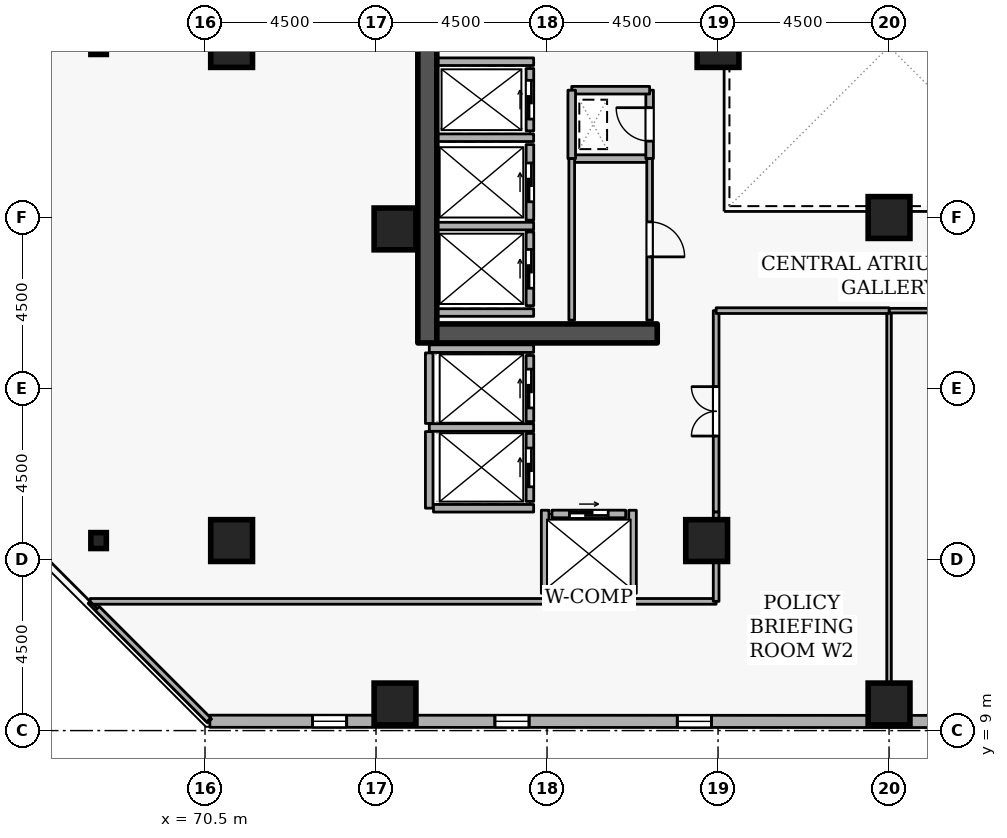
"""IFC4 building model, lengths in metres.
Left out: names, types, materials, properties, quantities, classifications, styles, units other than length and angle.
Written with IfcOpenShell. Run it as: python <this file> out.ifc"""

import sys

from ifc_helpers import new_model, si_unit, direction, frame, frame_2d, origin, origin_2d, place, context, subcontext, project, spatial, rectangle, i_section, extrude, element, fill, save


model = new_model("IFC4")
c1 = context("Model", 3, precision=1e-05, world=origin(), true_north=direction((0.0, 1.0)))
c2 = subcontext(c1, "Body", "Model", "MODEL_VIEW")
j1 = project(units=[si_unit("LENGTHUNIT", "METRE"), si_unit("PLANEANGLEUNIT", "RADIAN")], contexts=[c1])
p1 = place(None, origin())
s1 = spatial("IfcSite", under=j1, at=p1, CompositionType="ELEMENT")
p2 = place(p1, origin())
s2 = spatial("IfcBuilding", under=s1, at=p2, CompositionType="ELEMENT")
p3 = place(p2, frame((0.0, 0.0, 178.5)))
s3 = spatial("IfcBuildingStorey", under=s2, at=p3, CompositionType="ELEMENT", Elevation=178.5)
p4 = place(p3, frame((76.35, 19.2, 0.0), z_axis=(0.0, 0.0, 1.0), x_axis=(0.0, 1.0, 0.0)))
e1 = element("IfcWall", 1, at=p4, inside=s3, PredefinedType="SHEAR", context=c2, shape_type="SweptSolid", body=[
    extrude(rectangle(XDim=15.6, YDim=0.5, at=frame_2d((7.8, 0.0))), origin(), (0.0, 0.0, 1.0), 3.6),
])
p5 = place(p3, frame((76.6, 19.45, 0.0), z_axis=(0.0, 0.0, 1.0), x_axis=(1.0, 0.0, 0.0)))
e2 = element("IfcWall", 2, at=p5, inside=s3, PredefinedType="SHEAR", context=c2, shape_type="SweptSolid", body=[
    extrude(rectangle(XDim=5.8, YDim=0.5, at=frame_2d((2.9, 0.0))), origin(), (0.0, 0.0, 1.0), 3.6),
])
for number, where, z_axis, x_axis in (
    (3, (71.2, 14.0, 0.0), (0.0, 0.0, 1.0), (1.0, 0.0, 0.0)),
    (4, (71.2, 27.0, 0.0), (0.0, 0.0, 1.0), (1.0, 0.0, 0.0)),
    (5, (88.5, 9.7, 0.0), (0.0, 0.0, 1.0), (1.0, 0.0, 0.0)),
    (6, (75.5, 9.7, 0.0), (0.0, 0.0, 1.0), (1.0, 0.0, 0.0)),
    (7, (83.7, 14.0, 0.0), (0.0, 0.0, 1.0), (1.0, 0.0, 0.0)),
    (8, (75.5, 22.2, 0.0), (0.0, 0.0, 1.0), (1.0, 0.0, 0.0)),
    (9, (84.0, 27.0, 0.0), (0.0, 0.0, 1.0), (1.0, 0.0, 0.0)),
    (10, (88.5, 22.5, 0.0), (0.0, 0.0, 1.0), (1.0, 0.0, 0.0)),
):
    element("IfcColumn", number, at=place(p3, frame(where, z_axis=z_axis, x_axis=x_axis)), inside=s3, PredefinedType="COLUMN", context=c2, shape_type="SweptSolid", body=[
        extrude(rectangle(XDim=1.1, YDim=1.1, at=origin_2d()), origin(), (0.0, 0.0, 1.0), 3.6),
    ])
for number, where, z_axis, x_axis in (
    (11, (67.7, 14.0, 0.0), (0.0, 0.0, 1.0), (1.0, 0.0, 0.0)),
    (12, (67.7, 27.0, 0.0), (0.0, 0.0, 1.0), (1.0, 0.0, 0.0)),
):
    element("IfcColumn", number, at=place(p3, frame(where, z_axis=z_axis, x_axis=x_axis)), inside=s3, PredefinedType="COLUMN", context=c2, shape_type="SweptSolid", body=[
        extrude(i_section(OverallWidth=0.407, OverallDepth=0.419, WebThickness=0.031, FlangeThickness=0.049, FilletRadius=0.015, at=origin_2d()), origin(), (0.0, 0.0, 1.0), 3.6),
    ])
p6 = place(p3, frame((70.628, 9.246, 0.0), z_axis=(0.0, 0.0, 1.0), x_axis=(0.999999944762, -0.000332378036, 0.0)))
e13 = element("IfcWall", 13, at=p6, inside=s3, PredefinedType="STANDARD", context=c2, shape_type="SweptSolid", body=[
    extrude(rectangle(XDim=33.054, YDim=0.32, at=frame_2d((16.527, 0.0))), origin(), (0.0, 0.0, 1.0), 2.7),
])
p7 = place(p6, frame((2.7, 0.0, 0.72)))
e14 = element("IfcOpeningElement", 14, at=p7, cuts=e13, PredefinedType="OPENING", context=c2, shape_type="SweptSolid", body=[
    extrude(rectangle(XDim=0.9, YDim=1.75, at=frame_2d((0.45, 0.875))), frame((0.0, 0.17, 0.0), z_axis=(0.0, -1.0, 0.0), x_axis=(1.0, 0.0, 0.0)), (0.0, 0.0, 1.0), 0.34),
])
p8 = place(p6, frame((7.5, 0.0, 0.72)))
e15 = element("IfcOpeningElement", 15, at=p8, cuts=e13, PredefinedType="OPENING", context=c2, shape_type="SweptSolid", body=[
    extrude(rectangle(XDim=0.9, YDim=1.75, at=frame_2d((0.45, 0.875))), frame((0.0, 0.17, 0.0), z_axis=(0.0, -1.0, 0.0), x_axis=(1.0, 0.0, 0.0)), (0.0, 0.0, 1.0), 0.34),
])
p9 = place(p6, frame((12.3, 0.0, 0.72)))
e16 = element("IfcOpeningElement", 16, at=p9, cuts=e13, PredefinedType="OPENING", context=c2, shape_type="SweptSolid", body=[
    extrude(rectangle(XDim=0.9, YDim=1.75, at=frame_2d((0.45, 0.875))), frame((0.0, 0.17, 0.0), z_axis=(0.0, -1.0, 0.0), x_axis=(1.0, 0.0, 0.0)), (0.0, 0.0, 1.0), 0.34),
])
p10 = place(p6, frame((21.9, 0.0, 0.72)))
e17 = element("IfcOpeningElement", 17, at=p10, cuts=e13, PredefinedType="OPENING", context=c2, shape_type="SweptSolid", body=[
    extrude(rectangle(XDim=0.9, YDim=1.75, at=frame_2d((0.45, 0.875))), frame((0.0, 0.17, 0.0), z_axis=(0.0, -1.0, 0.0), x_axis=(1.0, 0.0, 0.0)), (0.0, 0.0, 1.0), 0.34),
])
p11 = place(p6, frame((26.7, 0.0, 0.72)))
e18 = element("IfcOpeningElement", 18, at=p11, cuts=e13, PredefinedType="OPENING", context=c2, shape_type="SweptSolid", body=[
    extrude(rectangle(XDim=0.9, YDim=1.75, at=frame_2d((0.45, 0.875))), frame((0.0, 0.17, 0.0), z_axis=(0.0, -1.0, 0.0), x_axis=(1.0, 0.0, 0.0)), (0.0, 0.0, 1.0), 0.34),
])
p12 = place(p3, frame((79.05, 24.78, 0.0), z_axis=(0.0, 0.0, 1.0), x_axis=(0.0, 1.0, 0.0)))
e19 = element("IfcWall", 19, at=p12, inside=s3, PredefinedType="STANDARD", context=c2, shape_type="SweptSolid", body=[
    extrude(rectangle(XDim=1.64, YDim=0.2, at=frame_2d((0.82, 0.0))), origin(), (0.0, 0.0, 1.0), 3.34),
])
p13 = place(p12, frame((0.31, 0.0, 0.0)))
e20 = element("IfcOpeningElement", 20, at=p13, cuts=e19, PredefinedType="OPENING", context=c2, shape_type="SweptSolid", body=[
    extrude(rectangle(XDim=1.02, YDim=2.06, at=frame_2d((0.51, 1.03))), frame((0.0, 0.11, 0.0), z_axis=(0.0, -1.0, 0.0), x_axis=(1.0, 0.0, 0.0)), (0.0, 0.0, 1.0), 0.22),
])
p14 = place(p3, frame((79.05, 22.43, 0.0), z_axis=(0.0, 0.0, 1.0), x_axis=(0.0, 1.0, 0.0)))
e21 = element("IfcWall", 21, at=p14, inside=s3, PredefinedType="STANDARD", context=c2, shape_type="SweptSolid", body=[
    extrude(rectangle(XDim=1.99, YDim=0.2, at=frame_2d((0.995, 0.0))), origin(), (0.0, 0.0, 1.0), 3.34),
])
p15 = place(p14, frame((0.485, 0.0, 0.0)))
e22 = element("IfcOpeningElement", 22, at=p15, cuts=e21, PredefinedType="OPENING", context=c2, shape_type="SweptSolid", body=[
    extrude(rectangle(XDim=1.02, YDim=2.06, at=frame_2d((0.51, 1.03))), frame((0.0, 0.11, 0.0), z_axis=(0.0, -1.0, 0.0), x_axis=(1.0, 0.0, 0.0)), (0.0, 0.0, 1.0), 0.22),
])
p16 = place(p3, frame((79.05, 20.18, 0.0), z_axis=(0.0, 0.0, 1.0), x_axis=(0.0, 1.0, 0.0)))
e23 = element("IfcWall", 23, at=p16, inside=s3, PredefinedType="STANDARD", context=c2, shape_type="SweptSolid", body=[
    extrude(rectangle(XDim=1.94, YDim=0.2, at=frame_2d((0.97, 0.0))), origin(), (0.0, 0.0, 1.0), 3.34),
])
p17 = place(p16, frame((0.46, 0.0, 0.0)))
e24 = element("IfcOpeningElement", 24, at=p17, cuts=e23, PredefinedType="OPENING", context=c2, shape_type="SweptSolid", body=[
    extrude(rectangle(XDim=1.02, YDim=2.06, at=frame_2d((0.51, 1.03))), frame((0.0, 0.11, 0.0), z_axis=(0.0, -1.0, 0.0), x_axis=(1.0, 0.0, 0.0)), (0.0, 0.0, 1.0), 0.22),
])
p18 = place(p3, frame((79.05, 17.13, 0.0), z_axis=(0.0, 0.0, 1.0), x_axis=(0.0, 1.0, 0.0)))
e25 = element("IfcWall", 25, at=p18, inside=s3, PredefinedType="STANDARD", context=c2, shape_type="SweptSolid", body=[
    extrude(rectangle(XDim=1.74, YDim=0.2, at=frame_2d((0.87, 0.0))), origin(), (0.0, 0.0, 1.0), 3.34),
])
p19 = place(p18, frame((0.36, 0.0, 0.0)))
e26 = element("IfcOpeningElement", 26, at=p19, cuts=e25, PredefinedType="OPENING", context=c2, shape_type="SweptSolid", body=[
    extrude(rectangle(XDim=1.02, YDim=2.06, at=frame_2d((0.51, 1.03))), frame((0.0, 0.11, 0.0), z_axis=(0.0, -1.0, 0.0), x_axis=(1.0, 0.0, 0.0)), (0.0, 0.0, 1.0), 0.22),
])
p20 = place(p3, frame((79.05, 15.03, 0.0), z_axis=(0.0, 0.0, 1.0), x_axis=(0.0, 1.0, 0.0)))
e27 = element("IfcWall", 27, at=p20, inside=s3, PredefinedType="STANDARD", context=c2, shape_type="SweptSolid", body=[
    extrude(rectangle(XDim=1.79, YDim=0.2, at=frame_2d((0.895, 0.0))), origin(), (0.0, 0.0, 1.0), 3.34),
])
p21 = place(p20, frame((0.385, 0.0, 0.0)))
e28 = element("IfcOpeningElement", 28, at=p21, cuts=e27, PredefinedType="OPENING", context=c2, shape_type="SweptSolid", body=[
    extrude(rectangle(XDim=1.02, YDim=2.06, at=frame_2d((0.51, 1.03))), frame((0.0, 0.11, 0.0), z_axis=(0.0, -1.0, 0.0), x_axis=(1.0, 0.0, 0.0)), (0.0, 0.0, 1.0), 0.22),
])
p22 = place(p3, frame((79.63, 14.7, 0.0), z_axis=(0.0, 0.0, 1.0), x_axis=(1.0, 0.0, 0.0)))
e29 = element("IfcWall", 29, at=p22, inside=s3, PredefinedType="STANDARD", context=c2, shape_type="SweptSolid", body=[
    extrude(rectangle(XDim=1.94, YDim=0.2, at=frame_2d((0.97, 0.0))), origin(), (0.0, 0.0, 1.0), 3.34),
])
p23 = place(p22, frame((0.46, 0.0, 0.0)))
e30 = element("IfcOpeningElement", 30, at=p23, cuts=e29, PredefinedType="OPENING", context=c2, shape_type="SweptSolid", body=[
    extrude(rectangle(XDim=1.02, YDim=2.06, at=frame_2d((0.51, 1.03))), frame((0.0, 0.11, 0.0), z_axis=(0.0, -1.0, 0.0), x_axis=(1.0, 0.0, 0.0)), (0.0, 0.0, 1.0), 0.22),
])
for number, where, z_axis, x_axis in (
    (31, (76.612, 26.6, 0.0), (0.0, 0.0, 1.0), (1.0, 0.0, 0.0)),
    (32, (76.612, 24.6, 0.0), (0.0, 0.0, 1.0), (1.0, 0.0, 0.0)),
    (33, (76.612, 22.275, 0.0), (0.0, 0.0, 1.0), (1.0, 0.0, 0.0)),
    (34, (76.612, 20.0, 0.0), (0.0, 0.0, 1.0), (1.0, 0.0, 0.0)),
):
    element("IfcWall", number, at=place(p3, frame(where, z_axis=z_axis, x_axis=x_axis)), inside=s3, PredefinedType="STANDARD", context=c2, shape_type="SweptSolid", body=[
        extrude(rectangle(XDim=2.536, YDim=0.2, at=frame_2d((1.268, 0.0))), origin(), (0.0, 0.0, 1.0), 3.34),
    ])
p24 = place(p3, frame((76.402, 19.05, 0.0), z_axis=(0.0, 0.0, 1.0), x_axis=(1.0, 0.0, 0.0)))
e35 = element("IfcWall", 35, at=p24, inside=s3, PredefinedType="STANDARD", context=c2, shape_type="SweptSolid", body=[
    extrude(rectangle(XDim=2.746, YDim=0.2, at=frame_2d((1.373, 0.0))), origin(), (0.0, 0.0, 1.0), 2.545),
])
p25 = place(p3, frame((76.402, 16.975, 0.0), z_axis=(0.0, 0.0, 1.0), x_axis=(1.0, 0.0, 0.0)))
e36 = element("IfcWall", 36, at=p25, inside=s3, PredefinedType="STANDARD", context=c2, shape_type="SweptSolid", body=[
    extrude(rectangle(XDim=2.746, YDim=0.2, at=frame_2d((1.373, 0.0))), origin(), (0.0, 0.0, 1.0), 3.34),
])
p26 = place(p3, frame((76.4, 14.852, 0.0), z_axis=(0.0, 0.0, 1.0), x_axis=(0.0, 1.0, 0.0)))
e37 = element("IfcWall", 37, at=p26, inside=s3, PredefinedType="STANDARD", context=c2, shape_type="SweptSolid", body=[
    extrude(rectangle(XDim=2.016, YDim=0.2, at=frame_2d((1.008, 0.0))), origin(), (0.0, 0.0, 1.0), 3.34),
])
p27 = place(p3, frame((76.4, 17.082, 0.0), z_axis=(0.0, 0.0, 1.0), x_axis=(0.0, 1.0, 0.0)))
e38 = element("IfcWall", 38, at=p27, inside=s3, PredefinedType="STANDARD", context=c2, shape_type="SweptSolid", body=[
    extrude(rectangle(XDim=1.856, YDim=0.2, at=frame_2d((0.928, 0.0))), origin(), (0.0, 0.0, 1.0), 3.34),
])
p28 = place(p3, frame((76.512, 14.85, 0.0), z_axis=(0.0, 0.0, 1.0), x_axis=(1.0, 0.0, 0.0)))
e39 = element("IfcWall", 39, at=p28, inside=s3, PredefinedType="STANDARD", context=c2, shape_type="SweptSolid", body=[
    extrude(rectangle(XDim=2.636, YDim=0.2, at=frame_2d((1.318, 0.0))), origin(), (0.0, 0.0, 1.0), 3.34),
])
p29 = place(p3, frame((79.452, 12.5, 0.0), z_axis=(0.0, 0.0, 1.0), x_axis=(1.0, 0.0, 0.0)))
e40 = element("IfcWall", 40, at=p29, inside=s3, PredefinedType="STANDARD", context=c2, shape_type="SweptSolid", body=[
    extrude(rectangle(XDim=2.296, YDim=0.2, at=frame_2d((1.148, 0.0))), origin(), (0.0, 0.0, 1.0), 3.34),
])
for number, where, z_axis, x_axis in (
    (41, (81.75, 12.612, 0.0), (0.0, 0.0, 1.0), (0.0, 1.0, 0.0)),
    (42, (79.45, 12.612, 0.0), (0.0, 0.0, 1.0), (0.0, 1.0, 0.0)),
):
    element("IfcWall", number, at=place(p3, frame(where, z_axis=z_axis, x_axis=x_axis)), inside=s3, PredefinedType="STANDARD", context=c2, shape_type="SweptSolid", body=[
        extrude(rectangle(XDim=2.186, YDim=0.2, at=frame_2d((1.093, 0.0))), origin(), (0.0, 0.0, 1.0), 3.34),
    ])
p30 = place(p3, frame((80.15, 24.05, 0.0), z_axis=(0.0, 0.0, 1.0), x_axis=(1.0, 0.0, 0.0)))
e43 = element("IfcWall", 43, at=p30, inside=s3, PredefinedType="STANDARD", context=c2, shape_type="SweptSolid", body=[
    extrude(rectangle(XDim=2.05, YDim=0.2, at=frame_2d((1.025, 0.0))), origin(), (0.0, 0.0, 1.0), 3.34),
])
p31 = place(p3, frame((82.2, 24.05, 0.0), z_axis=(0.0, 0.0, 1.0), x_axis=(0.0, 1.0, 0.0)))
e44 = element("IfcWall", 44, at=p31, inside=s3, PredefinedType="STANDARD", context=c2, shape_type="SweptSolid", body=[
    extrude(rectangle(XDim=1.8, YDim=0.2, at=frame_2d((0.9, 0.0))), origin(), (0.0, 0.0, 1.0), 3.34),
])
p32 = place(p31, frame((0.46, 0.0, 0.0)))
e45 = element("IfcOpeningElement", 45, at=p32, cuts=e44, PredefinedType="OPENING", context=c2, shape_type="SweptSolid", body=[
    extrude(rectangle(XDim=0.88, YDim=2.04, at=frame_2d((0.44, 1.02))), frame((0.0, 0.11, 0.0), z_axis=(0.0, -1.0, 0.0), x_axis=(1.0, 0.0, 0.0)), (0.0, 0.0, 1.0), 0.22),
])
p33 = place(p3, frame((82.2, 25.85, 0.0), z_axis=(0.0, 0.0, 1.0), x_axis=(-1.0, 0.0, 0.0)))
e46 = element("IfcWall", 46, at=p33, inside=s3, PredefinedType="STANDARD", context=c2, shape_type="SweptSolid", body=[
    extrude(rectangle(XDim=2.05, YDim=0.2, at=frame_2d((1.025, 0.0))), origin(), (0.0, 0.0, 1.0), 3.34),
])
p34 = place(p3, frame((80.15, 25.85, 0.0), z_axis=(0.0, 0.0, 1.0), x_axis=(0.0, -1.0, 0.0)))
e47 = element("IfcWall", 47, at=p34, inside=s3, PredefinedType="STANDARD", context=c2, shape_type="SweptSolid", body=[
    extrude(rectangle(XDim=1.8, YDim=0.2, at=frame_2d((0.9, 0.0))), origin(), (0.0, 0.0, 1.0), 3.34),
])
p35 = place(p3, frame((80.15, 19.8, 0.0), z_axis=(0.0, 0.0, 1.0), x_axis=(0.0, 1.0, 0.0)))
e48 = element("IfcWall", 48, at=p35, inside=s3, PredefinedType="PARTITIONING", context=c2, shape_type="SweptSolid", body=[
    extrude(rectangle(XDim=4.25, YDim=0.15, at=frame_2d((2.125, 0.0))), origin(), (0.0, 0.0, 1.0), 3.34),
])
p36 = place(p3, frame((82.2, 24.05, 0.0), z_axis=(0.0, 0.0, 1.0), x_axis=(0.0, -1.0, 0.0)))
e49 = element("IfcWall", 49, at=p36, inside=s3, PredefinedType="PARTITIONING", context=c2, shape_type="SweptSolid", body=[
    extrude(rectangle(XDim=4.25, YDim=0.15, at=frame_2d((2.125, 0.0))), origin(), (0.0, 0.0, 1.0), 3.34),
])
p37 = place(p36, frame((1.665, 0.0, 0.0)))
e50 = element("IfcOpeningElement", 50, at=p37, cuts=e49, PredefinedType="OPENING", context=c2, shape_type="SweptSolid", body=[
    extrude(rectangle(XDim=0.92, YDim=2.08, at=frame_2d((0.46, 1.04))), frame((0.0, 0.085, 0.0), z_axis=(0.0, -1.0, 0.0), x_axis=(1.0, 0.0, 0.0)), (0.0, 0.0, 1.0), 0.17),
])
p38 = place(p3, frame((88.5, 9.28, 0.0), z_axis=(0.0, 0.0, 1.0), x_axis=(0.0, 1.0, 0.0)))
e51 = element("IfcWall", 51, at=p38, inside=s3, PredefinedType="PARTITIONING", context=c2, shape_type="SweptSolid", body=[
    extrude(rectangle(XDim=10.77, YDim=0.12, at=frame_2d((5.385, 0.0))), origin(), (0.0, 0.0, 1.0), 2.932),
])
p39 = place(p3, frame((88.5, 20.05, 0.0), z_axis=(0.0, 0.0, 1.0), x_axis=(1.0, 0.0, 0.0)))
e52 = element("IfcWall", 52, at=p39, inside=s3, PredefinedType="PARTITIONING", context=c2, shape_type="SweptSolid", body=[
    extrude(rectangle(XDim=4.55, YDim=0.12, at=frame_2d((2.275, 0.0))), origin(), (0.0, 0.0, 1.0), 3.34),
])
p40 = place(p3, frame((83.95, 14.75, 0.0), z_axis=(0.0, 0.0, 1.0), x_axis=(0.0, 1.0, 0.0)))
e53 = element("IfcWall", 53, at=p40, inside=s3, PredefinedType="PARTITIONING", context=c2, shape_type="SweptSolid", body=[
    extrude(rectangle(XDim=5.3, YDim=0.15, at=frame_2d((2.65, 0.0))), origin(), (0.0, 0.0, 1.0), 3.34),
])
p41 = place(p40, frame((2.0, 0.0, 0.0)))
e54 = element("IfcOpeningElement", 54, at=p41, cuts=e53, PredefinedType="OPENING", context=c2, shape_type="SweptSolid", body=[
    extrude(rectangle(XDim=1.3, YDim=2.12, at=frame_2d((0.65, 1.06))), frame((0.0, 0.085, 0.0), z_axis=(0.0, -1.0, 0.0), x_axis=(1.0, 0.0, 0.0)), (0.0, 0.0, 1.0), 0.17),
])
p42 = place(p3, frame((83.95, 20.05, 0.0), z_axis=(0.0, 0.0, 1.0), x_axis=(1.0, 0.0, 0.0)))
e55 = element("IfcWall", 55, at=p42, inside=s3, PredefinedType="PARTITIONING", context=c2, shape_type="SweptSolid", body=[
    extrude(rectangle(XDim=4.55, YDim=0.15, at=frame_2d((2.275, 0.0))), origin(), (0.0, 0.0, 1.0), 3.34),
])
p43 = place(p3, frame((70.598, 9.28, 0.0), z_axis=(0.0, 0.0, 1.0), x_axis=(-0.707134446312, 0.707079114978, 0.0)))
e56 = element("IfcWall", 56, at=p43, inside=s3, PredefinedType="PARTITIONING", context=c2, shape_type="SweptSolid", body=[
    extrude(rectangle(XDim=4.412, YDim=0.15, at=frame_2d((2.206, 0.0))), origin(), (0.0, 0.0, 1.0), 3.34),
])
p44 = place(p3, frame((67.478, 12.4, 0.0), z_axis=(0.0, 0.0, 1.0), x_axis=(1.0, 0.0, 0.0)))
e57 = element("IfcWall", 57, at=p44, inside=s3, PredefinedType="PARTITIONING", context=c2, shape_type="SweptSolid", body=[
    extrude(rectangle(XDim=11.974, YDim=0.15, at=frame_2d((5.987, 0.0))), origin(), (0.0, 0.0, 1.0), 3.34),
])
p45 = place(p3, frame((81.748, 12.4, 0.0), z_axis=(0.0, 0.0, 1.0), x_axis=(1.0, 0.0, 0.0)))
e58 = element("IfcWall", 58, at=p45, inside=s3, PredefinedType="PARTITIONING", context=c2, shape_type="SweptSolid", body=[
    extrude(rectangle(XDim=2.202, YDim=0.15, at=frame_2d((1.101, 0.0))), origin(), (0.0, 0.0, 1.0), 3.34),
])
p46 = place(p3, frame((83.95, 12.4, 0.0), z_axis=(0.0, 0.0, 1.0), x_axis=(0.0, 1.0, 0.0)))
e59 = element("IfcWall", 59, at=p46, inside=s3, PredefinedType="PARTITIONING", context=c2, shape_type="SweptSolid", body=[
    extrude(rectangle(XDim=2.35, YDim=0.15, at=frame_2d((1.175, 0.0))), origin(), (0.0, 0.0, 1.0), 3.34),
])
p47 = place(p7, origin())
e60 = element("IfcWindow", 60, at=p47, inside=s3, PartitioningType="SINGLE_PANEL", PredefinedType="WINDOW", context=c2, shape_type="SweptSolid", body=[
    extrude(rectangle(XDim=0.9, YDim=1.75, at=frame_2d((0.45, 0.875))), frame((0.0, 0.03, 0.0), z_axis=(0.0, -1.0, 0.0), x_axis=(1.0, 0.0, 0.0)), (0.0, 0.0, 1.0), 0.06),
])
fill(e14, e60)
p48 = place(p8, origin())
e61 = element("IfcWindow", 61, at=p48, inside=s3, PartitioningType="SINGLE_PANEL", PredefinedType="WINDOW", context=c2, shape_type="SweptSolid", body=[
    extrude(rectangle(XDim=0.9, YDim=1.75, at=frame_2d((0.45, 0.875))), frame((0.0, 0.03, 0.0), z_axis=(0.0, -1.0, 0.0), x_axis=(1.0, 0.0, 0.0)), (0.0, 0.0, 1.0), 0.06),
])
fill(e15, e61)
p49 = place(p9, origin())
e62 = element("IfcWindow", 62, at=p49, inside=s3, PartitioningType="SINGLE_PANEL", PredefinedType="WINDOW", context=c2, shape_type="SweptSolid", body=[
    extrude(rectangle(XDim=0.9, YDim=1.75, at=frame_2d((0.45, 0.875))), frame((0.0, 0.03, 0.0), z_axis=(0.0, -1.0, 0.0), x_axis=(1.0, 0.0, 0.0)), (0.0, 0.0, 1.0), 0.06),
])
fill(e16, e62)
p50 = place(p13, origin())
e63 = element("IfcDoor", 63, at=p50, inside=s3, OperationType="SLIDING_TO_LEFT", PredefinedType="DOOR", context=c2, shape_type="SweptSolid", body=[
    extrude(rectangle(XDim=1.02, YDim=2.06, at=frame_2d((0.51, 1.03))), frame((0.0, 0.025, 0.0), z_axis=(0.0, -1.0, 0.0), x_axis=(1.0, 0.0, 0.0)), (0.0, 0.0, 1.0), 0.05),
])
fill(e20, e63)
p51 = place(p15, origin())
e64 = element("IfcDoor", 64, at=p51, inside=s3, OperationType="SLIDING_TO_LEFT", PredefinedType="DOOR", context=c2, shape_type="SweptSolid", body=[
    extrude(rectangle(XDim=1.02, YDim=2.06, at=frame_2d((0.51, 1.03))), frame((0.0, 0.025, 0.0), z_axis=(0.0, -1.0, 0.0), x_axis=(1.0, 0.0, 0.0)), (0.0, 0.0, 1.0), 0.05),
])
fill(e22, e64)
p52 = place(p17, origin())
e65 = element("IfcDoor", 65, at=p52, inside=s3, OperationType="SLIDING_TO_LEFT", PredefinedType="DOOR", context=c2, shape_type="SweptSolid", body=[
    extrude(rectangle(XDim=1.02, YDim=2.06, at=frame_2d((0.51, 1.03))), frame((0.0, 0.025, 0.0), z_axis=(0.0, -1.0, 0.0), x_axis=(1.0, 0.0, 0.0)), (0.0, 0.0, 1.0), 0.05),
])
fill(e24, e65)
p53 = place(p19, origin())
e66 = element("IfcDoor", 66, at=p53, inside=s3, OperationType="SLIDING_TO_LEFT", PredefinedType="DOOR", context=c2, shape_type="SweptSolid", body=[
    extrude(rectangle(XDim=1.02, YDim=2.06, at=frame_2d((0.51, 1.03))), frame((0.0, 0.025, 0.0), z_axis=(0.0, -1.0, 0.0), x_axis=(1.0, 0.0, 0.0)), (0.0, 0.0, 1.0), 0.05),
])
fill(e26, e66)
p54 = place(p21, origin())
e67 = element("IfcDoor", 67, at=p54, inside=s3, OperationType="SLIDING_TO_LEFT", PredefinedType="DOOR", context=c2, shape_type="SweptSolid", body=[
    extrude(rectangle(XDim=1.02, YDim=2.06, at=frame_2d((0.51, 1.03))), frame((0.0, 0.025, 0.0), z_axis=(0.0, -1.0, 0.0), x_axis=(1.0, 0.0, 0.0)), (0.0, 0.0, 1.0), 0.05),
])
fill(e28, e67)
p55 = place(p23, origin())
e68 = element("IfcDoor", 68, at=p55, inside=s3, OperationType="SLIDING_TO_LEFT", PredefinedType="DOOR", context=c2, shape_type="SweptSolid", body=[
    extrude(rectangle(XDim=1.02, YDim=2.06, at=frame_2d((0.51, 1.03))), frame((0.0, 0.025, 0.0), z_axis=(0.0, -1.0, 0.0), x_axis=(1.0, 0.0, 0.0)), (0.0, 0.0, 1.0), 0.05),
])
fill(e30, e68)
p56 = place(p32, origin())
e69 = element("IfcDoor", 69, at=p56, inside=s3, OperationType="SINGLE_SWING_RIGHT", PredefinedType="DOOR", context=c2, shape_type="SweptSolid", body=[
    extrude(rectangle(XDim=0.88, YDim=2.04, at=frame_2d((0.44, 1.02))), frame((0.0, 0.025, 0.0), z_axis=(0.0, -1.0, 0.0), x_axis=(1.0, 0.0, 0.0)), (0.0, 0.0, 1.0), 0.05),
])
fill(e45, e69)
p57 = place(p37, origin())
e70 = element("IfcDoor", 70, at=p57, inside=s3, OperationType="SINGLE_SWING_RIGHT", PredefinedType="DOOR", context=c2, shape_type="SweptSolid", body=[
    extrude(rectangle(XDim=0.92, YDim=2.08, at=frame_2d((0.46, 1.04))), frame((0.0, 0.025, 0.0), z_axis=(0.0, -1.0, 0.0), x_axis=(1.0, 0.0, 0.0)), (0.0, 0.0, 1.0), 0.05),
])
fill(e50, e70)
p58 = place(p41, origin())
e71 = element("IfcDoor", 71, at=p58, inside=s3, OperationType="DOUBLE_DOOR_SINGLE_SWING", PredefinedType="DOOR", context=c2, shape_type="SweptSolid", body=[
    extrude(rectangle(XDim=1.3, YDim=2.12, at=frame_2d((0.65, 1.06))), frame((0.0, 0.025, 0.0), z_axis=(0.0, -1.0, 0.0), x_axis=(1.0, 0.0, 0.0)), (0.0, 0.0, 1.0), 0.05),
])
fill(e54, e71)
save(model, sys.argv[1])
